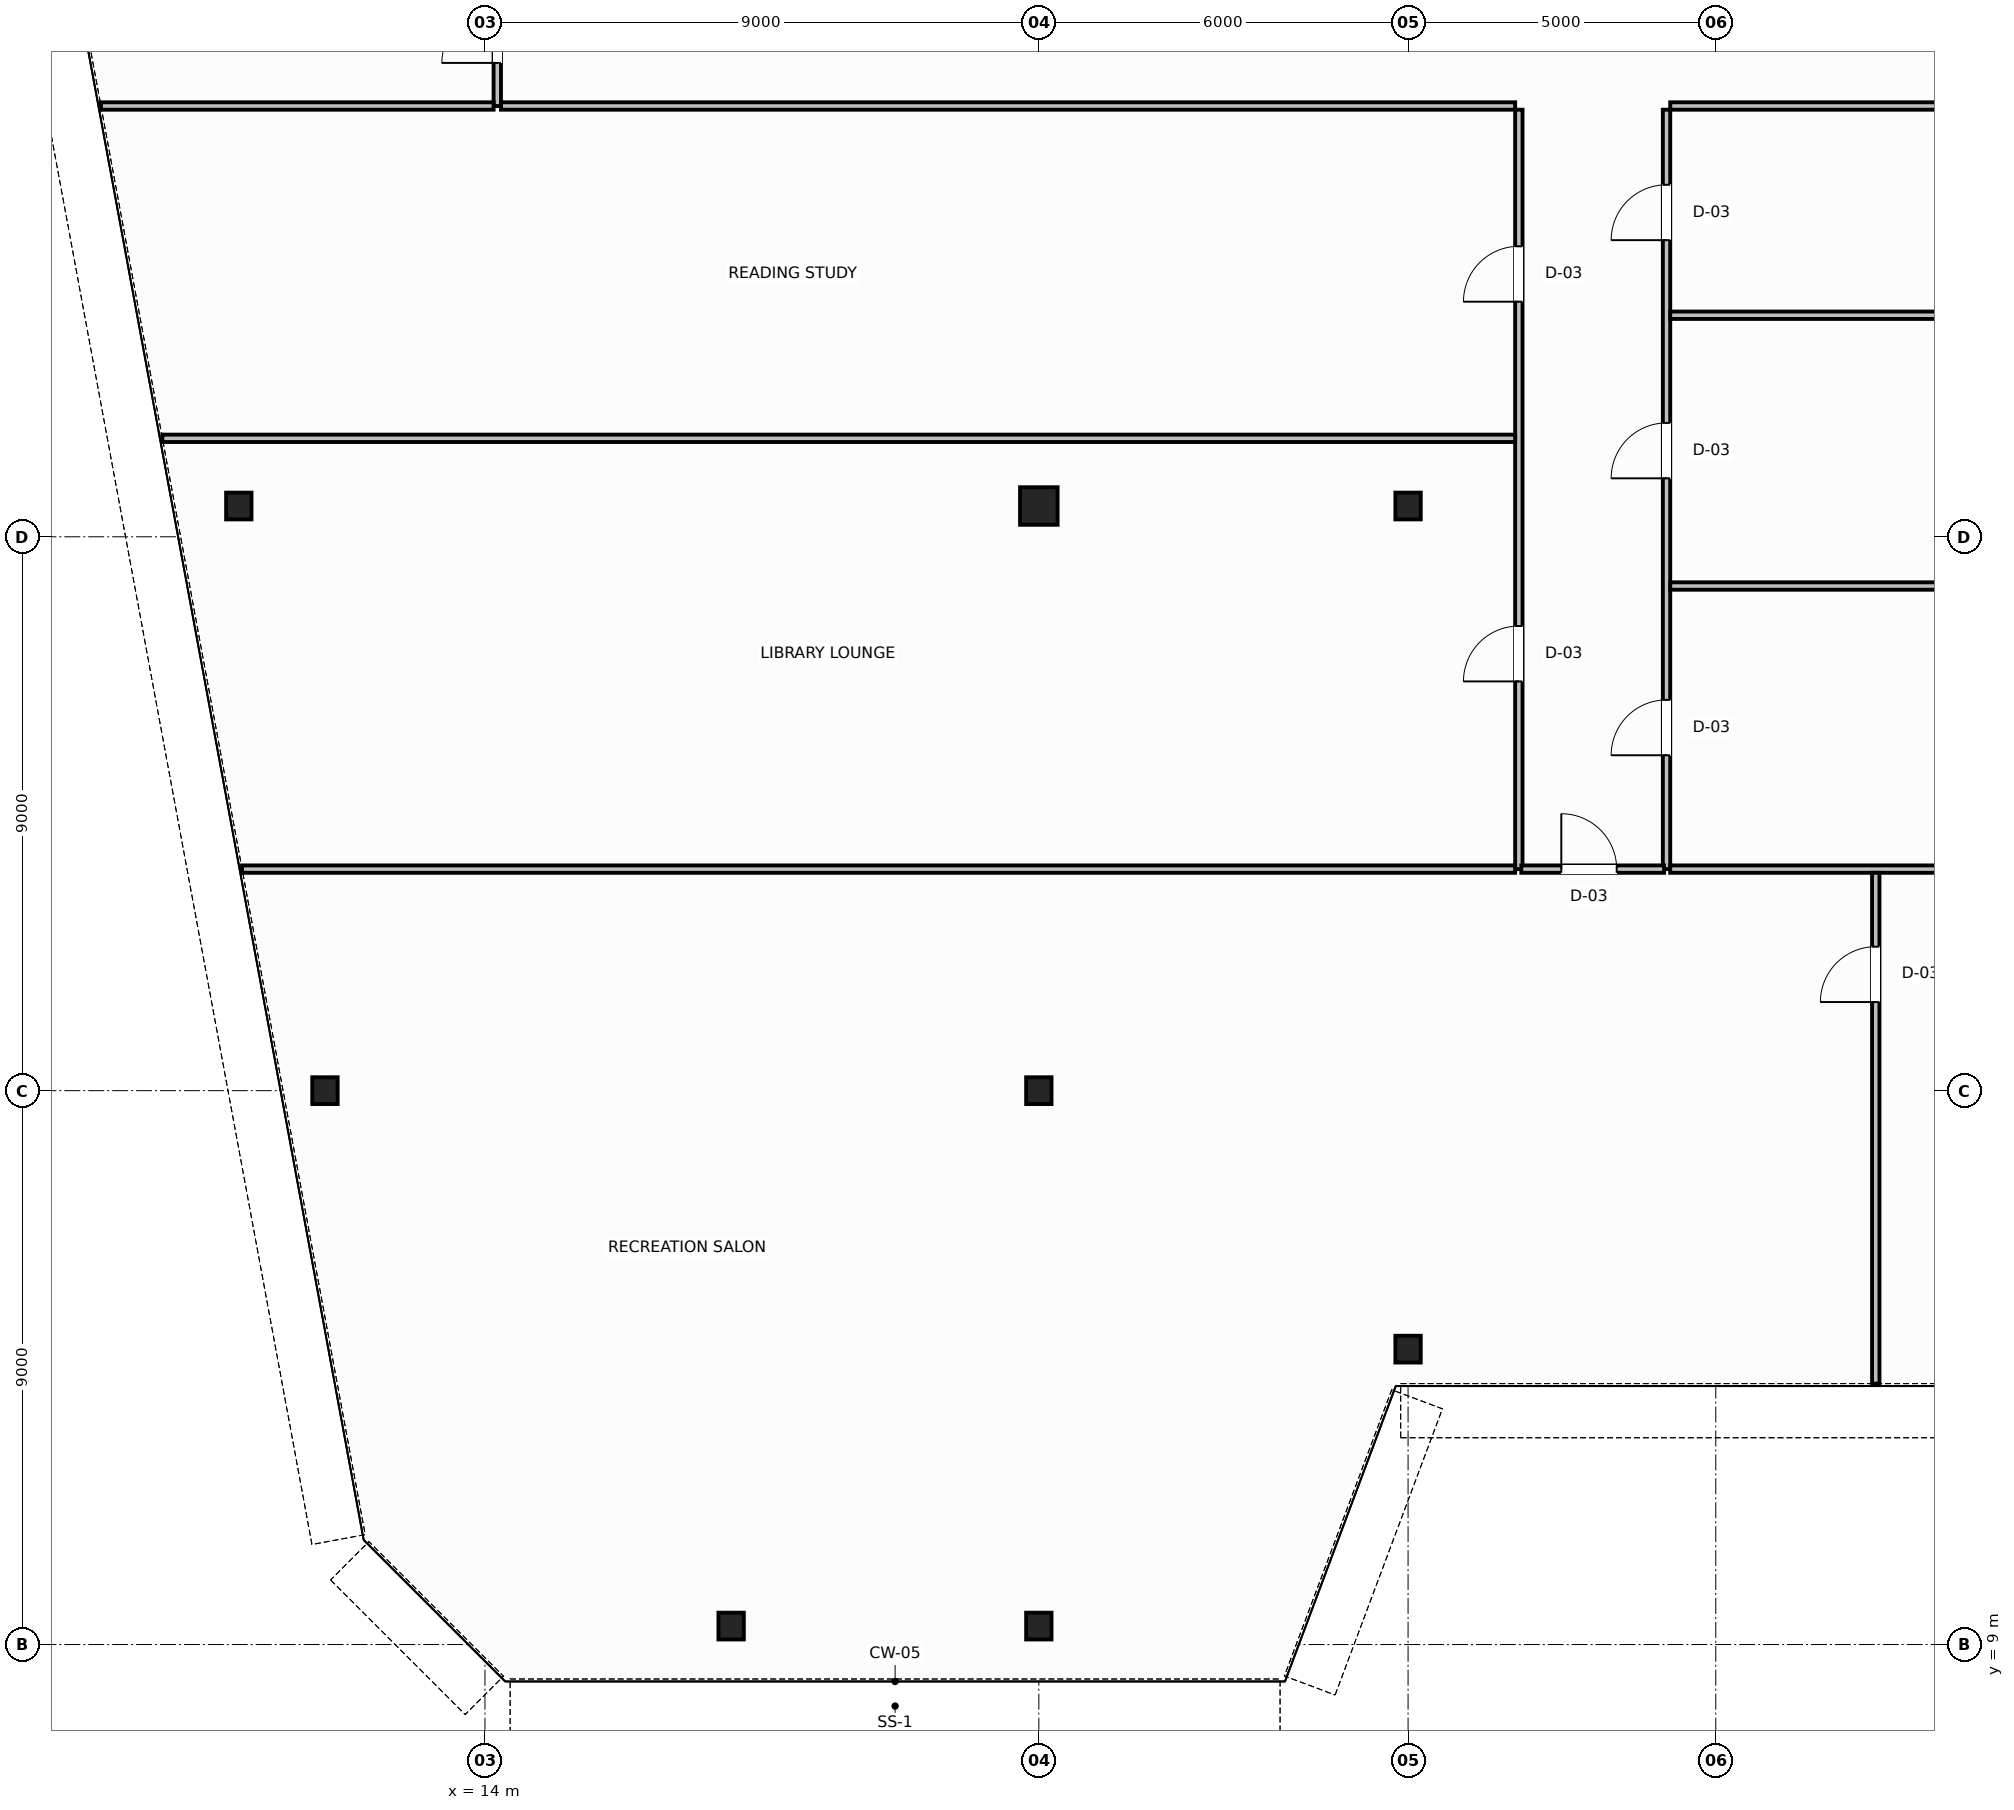
"""IFC4 building model, lengths in metres.
Left out: names, types, materials, properties, quantities, classifications, styles, units other than length and angle.
Written with IfcOpenShell. Run it as: python <this file> out.ifc"""

import sys

from ifc_helpers import new_model, si_unit, direction, frame, frame_2d, origin, origin_2d, place, context, subcontext, project, spatial, rectangle, hollow_circle, i_section, extrude, source, transform, mapped, element, fill, save


model = new_model("IFC4")
c1 = context("Model", 3, precision=1e-05, world=origin(), true_north=direction((0.0, 1.0)))
c2 = subcontext(c1, "Body", "Model", "MODEL_VIEW")
j1 = project(units=[si_unit("LENGTHUNIT", "METRE"), si_unit("PLANEANGLEUNIT", "RADIAN")], contexts=[c1])
p1 = place(None, origin())
s1 = spatial("IfcSite", under=j1, at=p1, CompositionType="ELEMENT")
p2 = place(p1, origin())
s2 = spatial("IfcBuilding", under=s1, at=p2, CompositionType="ELEMENT")
p3 = place(p2, frame((0.0, 0.0, 227.0)))
s3 = spatial("IfcBuildingStorey", under=s2, at=p3, CompositionType="ELEMENT", Elevation=227.0)
m1 = source(origin(), c2, "Body", "SweptSolid", [
    extrude(i_section(OverallWidth=0.412, OverallDepth=0.435, WebThickness=0.036, FlangeThickness=0.05, FilletRadius=0.015, at=origin_2d()), origin(), (0.0, 0.0, 1.0), 3.8),
])
for number, where, z_axis, x_axis in (
    (1, (10.0, 27.5, 0.0), (0.0, 0.0, 1.0), (1.0, 0.0, 0.0)),
    (2, (11.4, 18.0, 0.0), (0.0, 0.0, 1.0), (1.0, 0.0, 0.0)),
):
    element("IfcColumn", number, at=place(p3, frame(where, z_axis=z_axis, x_axis=x_axis)), inside=s3, PredefinedType="COLUMN", context=c2, shape_type="MappedRepresentation", body=[
        mapped(m1, transform((0.0, 0.0, 0.0), scale=1.0)),
    ])
m2 = source(origin(), c2, "Body", "SweptSolid", [
    extrude(hollow_circle(Radius=0.305, WallThickness=0.03, at=origin_2d()), origin(), (0.0, 0.0, 1.0), 3.8),
])
p4 = place(p3, frame((23.0, 27.5, 0.0), z_axis=(0.0, 0.0, 1.0), x_axis=(1.0, 0.0, 0.0)))
e3 = element("IfcColumn", 3, at=p4, inside=s3, PredefinedType="COLUMN", context=c2, shape_type="MappedRepresentation", body=[
    mapped(m2, transform((0.0, 0.0, 0.0), scale=1.0)),
])
m3 = source(origin(), c2, "Body", "SweptSolid", [
    extrude(i_section(OverallWidth=0.412, OverallDepth=0.435, WebThickness=0.036, FlangeThickness=0.05, FilletRadius=0.015, at=origin_2d()), origin(), (0.0, 0.0, 1.0), 3.8),
])
for number, where, z_axis, x_axis in (
    (4, (29.0, 27.5, 0.0), (0.0, 0.0, 1.0), (1.0, 0.0, 0.0)),
    (5, (23.0, 18.0, 0.0), (0.0, 0.0, 1.0), (1.0, 0.0, 0.0)),
    (6, (18.0, 9.3, 0.0), (0.0, 0.0, 1.0), (1.0, 0.0, 0.0)),
    (7, (23.0, 9.3, 0.0), (0.0, 0.0, 1.0), (1.0, 0.0, 0.0)),
    (8, (29.0, 13.8, 0.0), (0.0, 0.0, 1.0), (1.0, 0.0, 0.0)),
):
    element("IfcColumn", number, at=place(p3, frame(where, z_axis=z_axis, x_axis=x_axis)), inside=s3, PredefinedType="COLUMN", context=c2, shape_type="MappedRepresentation", body=[
        mapped(m3, transform((0.0, 0.0, 0.0), scale=1.0)),
    ])
p5 = place(p3, frame((14.26, 34.0, 0.0), z_axis=(0.0, 0.0, 1.0), x_axis=(1.0, 0.0, 0.0)))
e9 = element("IfcWall", 9, at=p5, inside=s3, PredefinedType="PARTITIONING", context=c2, shape_type="SweptSolid", body=[
    extrude(rectangle(XDim=16.48, YDim=0.12, at=frame_2d((8.24, 0.0))), origin(), (0.0, 0.0, 1.0), 3.58),
])
p6 = place(p3, frame((33.26, 34.0, 0.0), z_axis=(0.0, 0.0, 1.0), x_axis=(1.0, 0.0, 0.0)))
e10 = element("IfcWall", 10, at=p6, inside=s3, PredefinedType="PARTITIONING", context=c2, shape_type="SweptSolid", body=[
    extrude(rectangle(XDim=20.48, YDim=0.12, at=frame_2d((10.24, 0.0))), origin(), (0.0, 0.0, 1.0), 3.58),
])
p7 = place(p3, frame((14.2, 34.0, 0.0), z_axis=(0.0, 0.0, 1.0), x_axis=(0.0, 1.0, 0.0)))
e11 = element("IfcWall", 11, at=p7, inside=s3, PredefinedType="PARTITIONING", context=c2, shape_type="SweptSolid", body=[
    extrude(rectangle(XDim=2.44, YDim=0.12, at=frame_2d((1.22, 0.0))), origin(), (0.0, 0.0, 1.0), 3.58),
])
p8 = place(p7, frame((0.7, 0.0, 0.0)))
e12 = element("IfcOpeningElement", 12, at=p8, cuts=e11, PredefinedType="OPENING", context=c2, shape_type="SweptSolid", body=[
    extrude(rectangle(XDim=0.9, YDim=2.15, at=frame_2d((0.45, 1.075))), frame((0.0, 0.07, 0.0), z_axis=(0.0, -1.0, 0.0), x_axis=(1.0, 0.0, 0.0)), (0.0, 0.0, 1.0), 0.14),
])
p9 = place(p3, frame((30.8, 21.6, 0.0), z_axis=(0.0, 0.0, 1.0), x_axis=(0.0, 1.0, 0.0)))
e13 = element("IfcWall", 13, at=p9, inside=s3, PredefinedType="PARTITIONING", context=c2, shape_type="SweptSolid", body=[
    extrude(rectangle(XDim=12.34, YDim=0.12, at=frame_2d((6.17, 0.0))), origin(), (0.0, 0.0, 1.0), 3.58),
])
p10 = place(p9, frame((3.05, 0.0, 0.0)))
e14 = element("IfcOpeningElement", 14, at=p10, cuts=e13, PredefinedType="OPENING", context=c2, shape_type="SweptSolid", body=[
    extrude(rectangle(XDim=0.9, YDim=2.15, at=frame_2d((0.45, 1.075))), frame((0.0, 0.07, 0.0), z_axis=(0.0, -1.0, 0.0), x_axis=(1.0, 0.0, 0.0)), (0.0, 0.0, 1.0), 0.14),
])
p11 = place(p9, frame((9.22, 0.0, 0.0)))
e15 = element("IfcOpeningElement", 15, at=p11, cuts=e13, PredefinedType="OPENING", context=c2, shape_type="SweptSolid", body=[
    extrude(rectangle(XDim=0.9, YDim=2.15, at=frame_2d((0.45, 1.075))), frame((0.0, 0.07, 0.0), z_axis=(0.0, -1.0, 0.0), x_axis=(1.0, 0.0, 0.0)), (0.0, 0.0, 1.0), 0.14),
])
p12 = place(p3, frame((33.2, 21.6, 0.0), z_axis=(0.0, 0.0, 1.0), x_axis=(0.0, 1.0, 0.0)))
e16 = element("IfcWall", 16, at=p12, inside=s3, PredefinedType="PARTITIONING", context=c2, shape_type="SweptSolid", body=[
    extrude(rectangle(XDim=12.34, YDim=0.12, at=frame_2d((6.17, 0.0))), origin(), (0.0, 0.0, 1.0), 3.58),
])
p13 = place(p12, frame((1.85, 0.0, 0.0)))
e17 = element("IfcOpeningElement", 17, at=p13, cuts=e16, PredefinedType="OPENING", context=c2, shape_type="SweptSolid", body=[
    extrude(rectangle(XDim=0.9, YDim=2.15, at=frame_2d((0.45, 1.075))), frame((0.0, 0.07, 0.0), z_axis=(0.0, -1.0, 0.0), x_axis=(1.0, 0.0, 0.0)), (0.0, 0.0, 1.0), 0.14),
])
p14 = place(p12, frame((6.35, 0.0, 0.0)))
e18 = element("IfcOpeningElement", 18, at=p14, cuts=e16, PredefinedType="OPENING", context=c2, shape_type="SweptSolid", body=[
    extrude(rectangle(XDim=0.9, YDim=2.15, at=frame_2d((0.45, 1.075))), frame((0.0, 0.07, 0.0), z_axis=(0.0, -1.0, 0.0), x_axis=(1.0, 0.0, 0.0)), (0.0, 0.0, 1.0), 0.14),
])
p15 = place(p12, frame((10.22, 0.0, 0.0)))
e19 = element("IfcOpeningElement", 19, at=p15, cuts=e16, PredefinedType="OPENING", context=c2, shape_type="SweptSolid", body=[
    extrude(rectangle(XDim=0.9, YDim=2.15, at=frame_2d((0.45, 1.075))), frame((0.0, 0.07, 0.0), z_axis=(0.0, -1.0, 0.0), x_axis=(1.0, 0.0, 0.0)), (0.0, 0.0, 1.0), 0.14),
])
p16 = place(p3, frame((30.84, 21.6, 0.0), z_axis=(0.0, 0.0, 1.0), x_axis=(1.0, 0.0, 0.0)))
e20 = element("IfcWall", 20, at=p16, inside=s3, PredefinedType="PARTITIONING", context=c2, shape_type="SweptSolid", body=[
    extrude(rectangle(XDim=2.32, YDim=0.12, at=frame_2d((1.16, 0.0))), origin(), (0.0, 0.0, 1.0), 3.58),
])
p17 = place(p16, frame((0.65, 0.0, 0.0)))
e21 = element("IfcOpeningElement", 21, at=p17, cuts=e20, PredefinedType="OPENING", context=c2, shape_type="SweptSolid", body=[
    extrude(rectangle(XDim=0.9, YDim=2.15, at=frame_2d((0.45, 1.075))), frame((0.0, 0.07, 0.0), z_axis=(0.0, -1.0, 0.0), x_axis=(1.0, 0.0, 0.0)), (0.0, 0.0, 1.0), 0.14),
])
p18 = place(p3, frame((7.759, 34.0, 0.0), z_axis=(0.0, 0.0, 1.0), x_axis=(1.0, 0.0, 0.0)))
e22 = element("IfcWall", 22, at=p18, inside=s3, PredefinedType="PARTITIONING", context=c2, shape_type="SweptSolid", body=[
    extrude(rectangle(XDim=6.381, YDim=0.12, at=frame_2d((3.19, 0.0))), origin(), (0.0, 0.0, 1.0), 3.58),
])
p19 = place(p3, frame((8.758, 28.6, 0.0), z_axis=(0.0, 0.0, 1.0), x_axis=(1.0, 0.0, 0.0)))
e23 = element("IfcWall", 23, at=p19, inside=s3, PredefinedType="PARTITIONING", context=c2, shape_type="SweptSolid", body=[
    extrude(rectangle(XDim=21.982, YDim=0.12, at=frame_2d((10.991, 0.0))), origin(), (0.0, 0.0, 1.0), 3.58),
])
p20 = place(p3, frame((33.26, 26.2, 0.0), z_axis=(0.0, 0.0, 1.0), x_axis=(1.0, 0.0, 0.0)))
e24 = element("IfcWall", 24, at=p20, inside=s3, PredefinedType="PARTITIONING", context=c2, shape_type="SweptSolid", body=[
    extrude(rectangle(XDim=25.538, YDim=0.12, at=frame_2d((12.769, 0.0))), origin(), (0.0, 0.0, 1.0), 3.58),
])
p21 = place(p3, frame((33.26, 30.6, 0.0), z_axis=(0.0, 0.0, 1.0), x_axis=(1.0, 0.0, 0.0)))
e25 = element("IfcWall", 25, at=p21, inside=s3, PredefinedType="PARTITIONING", context=c2, shape_type="SweptSolid", body=[
    extrude(rectangle(XDim=26.352, YDim=0.12, at=frame_2d((13.176, 0.0))), origin(), (0.0, 0.0, 1.0), 3.58),
])
p22 = place(p3, frame((10.053, 21.6, 0.0), z_axis=(0.0, 0.0, 1.0), x_axis=(1.0, 0.0, 0.0)))
e26 = element("IfcWall", 26, at=p22, inside=s3, PredefinedType="PARTITIONING", context=c2, shape_type="SweptSolid", body=[
    extrude(rectangle(XDim=20.687, YDim=0.12, at=frame_2d((10.344, 0.0))), origin(), (0.0, 0.0, 1.0), 3.58),
])
p23 = place(p3, frame((33.26, 21.6, 0.0), z_axis=(0.0, 0.0, 1.0), x_axis=(1.0, 0.0, 0.0)))
e27 = element("IfcWall", 27, at=p23, inside=s3, PredefinedType="PARTITIONING", context=c2, shape_type="SweptSolid", body=[
    extrude(rectangle(XDim=24.687, YDim=0.12, at=frame_2d((12.344, 0.0))), origin(), (0.0, 0.0, 1.0), 3.58),
])
p24 = place(p3, frame((36.6, 13.24, 0.0), z_axis=(0.0, 0.0, 1.0), x_axis=(0.0, 1.0, 0.0)))
e28 = element("IfcWall", 28, at=p24, inside=s3, PredefinedType="PARTITIONING", context=c2, shape_type="SweptSolid", body=[
    extrude(rectangle(XDim=8.3, YDim=0.12, at=frame_2d((4.15, 0.0))), origin(), (0.0, 0.0, 1.0), 3.58),
])
p25 = place(p24, frame((6.2, 0.0, 0.0)))
e29 = element("IfcOpeningElement", 29, at=p25, cuts=e28, PredefinedType="OPENING", context=c2, shape_type="SweptSolid", body=[
    extrude(rectangle(XDim=0.9, YDim=2.15, at=frame_2d((0.45, 1.075))), frame((0.0, 0.07, 0.0), z_axis=(0.0, -1.0, 0.0), x_axis=(1.0, 0.0, 0.0)), (0.0, 0.0, 1.0), 0.14),
])
m4 = source(origin(), c2, "Body", "SweptSolid", [
    extrude(rectangle(XDim=0.9, YDim=2.15, at=frame_2d((0.45, 1.075))), frame((0.0, 0.025, 0.0), z_axis=(0.0, -1.0, 0.0), x_axis=(1.0, 0.0, 0.0)), (0.0, 0.0, 1.0), 0.05),
])
p26 = place(p8, origin())
e30 = element("IfcDoor", 30, at=p26, inside=s3, OperationType="SINGLE_SWING_LEFT", PredefinedType="DOOR", context=c2, shape_type="MappedRepresentation", body=[
    mapped(m4, transform((0.0, 0.0, 0.0), scale=1.0)),
])
fill(e12, e30)
p27 = place(p10, origin())
e31 = element("IfcDoor", 31, at=p27, inside=s3, OperationType="SINGLE_SWING_LEFT", PredefinedType="DOOR", context=c2, shape_type="MappedRepresentation", body=[
    mapped(m4, transform((0.0, 0.0, 0.0), scale=1.0)),
])
fill(e14, e31)
p28 = place(p11, origin())
e32 = element("IfcDoor", 32, at=p28, inside=s3, OperationType="SINGLE_SWING_RIGHT", PredefinedType="DOOR", context=c2, shape_type="MappedRepresentation", body=[
    mapped(m4, transform((0.0, 0.0, 0.0), scale=1.0)),
])
fill(e15, e32)
p29 = place(p13, origin())
e33 = element("IfcDoor", 33, at=p29, inside=s3, OperationType="SINGLE_SWING_RIGHT", PredefinedType="DOOR", context=c2, shape_type="MappedRepresentation", body=[
    mapped(m4, transform((0.0, 0.0, 0.0), scale=1.0)),
])
fill(e17, e33)
p30 = place(p14, origin())
e34 = element("IfcDoor", 34, at=p30, inside=s3, OperationType="SINGLE_SWING_LEFT", PredefinedType="DOOR", context=c2, shape_type="MappedRepresentation", body=[
    mapped(m4, transform((0.0, 0.0, 0.0), scale=1.0)),
])
fill(e18, e34)
p31 = place(p15, origin())
e35 = element("IfcDoor", 35, at=p31, inside=s3, OperationType="SINGLE_SWING_RIGHT", PredefinedType="DOOR", context=c2, shape_type="MappedRepresentation", body=[
    mapped(m4, transform((0.0, 0.0, 0.0), scale=1.0)),
])
fill(e19, e35)
p32 = place(p17, origin())
e36 = element("IfcDoor", 36, at=p32, inside=s3, OperationType="SINGLE_SWING_LEFT", PredefinedType="DOOR", context=c2, shape_type="MappedRepresentation", body=[
    mapped(m4, transform((0.0, 0.0, 0.0), scale=1.0)),
])
fill(e21, e36)
p33 = place(p25, origin())
e37 = element("IfcDoor", 37, at=p33, inside=s3, OperationType="SINGLE_SWING_RIGHT", PredefinedType="DOOR", context=c2, shape_type="MappedRepresentation", body=[
    mapped(m4, transform((0.0, 0.0, 0.0), scale=1.0)),
])
fill(e29, e37)
save(model, sys.argv[1])
